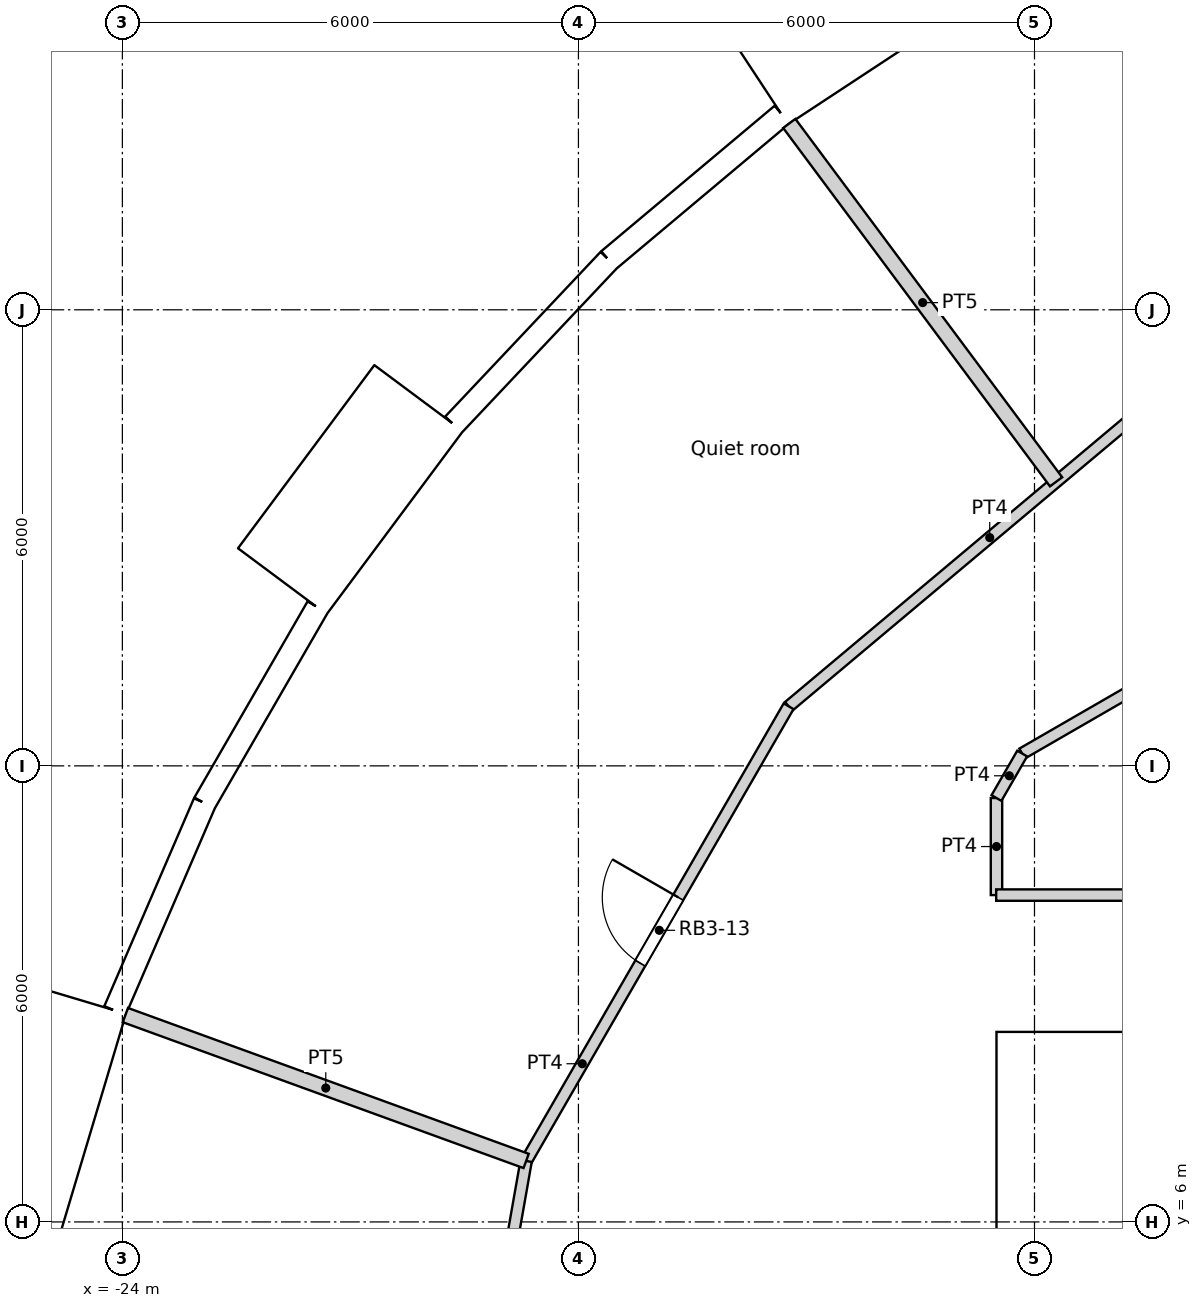
"""IFC4 building model, lengths in metres.
Left out: names, types, materials, properties, quantities, classifications, styles, units other than length and angle.
Written with IfcOpenShell. Run it as: python <this file> out.ifc"""

import sys

from ifc_helpers import new_model, si_unit, direction, frame, frame_2d, origin, origin_2d, place, context, subcontext, project, spatial, rectangle, circle, extrude, element, fill, save


model = new_model("IFC4")
c1 = context("Model", 3, precision=1e-05, world=origin(), true_north=direction((0.0, 1.0)))
c2 = subcontext(c1, "Body", "Model", "MODEL_VIEW")
j1 = project(units=[si_unit("LENGTHUNIT", "METRE"), si_unit("PLANEANGLEUNIT", "RADIAN")], contexts=[c1])
p1 = place(None, origin())
s1 = spatial("IfcSite", under=j1, at=p1, CompositionType="ELEMENT")
p2 = place(p1, origin())
s2 = spatial("IfcBuilding", under=s1, at=p2, CompositionType="ELEMENT")
p3 = place(p2, frame((0.0, 0.0, 147.6)))
s3 = spatial("IfcBuildingStorey", under=s2, at=p3, CompositionType="ELEMENT", Elevation=147.6)
for number, where, z_axis, x_axis in (
    (1, (-12.274, 21.259, 0.0), (0.0, 0.0, 1.0), (1.0, 0.0, 0.0)),
    (2, (-16.846, 17.855, 0.0), (0.0, 0.0, 1.0), (1.0, 0.0, 0.0)),
    (3, (-20.509, 13.489, 0.0), (0.0, 0.0, 1.0), (1.0, 0.0, 0.0)),
    (4, (-23.067, 8.396, 0.0), (0.0, 0.0, 1.0), (1.0, 0.0, 0.0)),
):
    element("IfcColumn", number, at=place(p3, frame(where, z_axis=z_axis, x_axis=x_axis)), inside=s3, PredefinedType="COLUMN", context=c2, shape_type="SweptSolid", body=[
        extrude(circle(Radius=0.6, at=origin_2d()), origin(), (0.0, 0.0, 1.0), 3.6),
    ])
for number, where, z_axis, x_axis in (
    (5, (-13.798, 12.802, 0.0), (0.0, 0.0, 1.0), (1.0, 0.0, 0.0)),
    (6, (-16.958, 8.167, 0.0), (0.0, 0.0, 1.0), (1.0, 0.0, 0.0)),
):
    element("IfcColumn", number, at=place(p3, frame(where, z_axis=z_axis, x_axis=x_axis)), inside=s3, PredefinedType="COLUMN", context=c2, shape_type="SweptSolid", body=[
        extrude(circle(Radius=0.65, at=origin_2d()), origin(), (0.0, 0.0, 1.0), 3.6),
    ])
p4 = place(p3, frame((-13.132, 22.697, -0.3), z_axis=(0.0, 0.0, 1.0), x_axis=(-0.835514416706, -0.549468524554, 0.0)))
e7 = element("IfcWall", 7, at=p4, inside=s3, PredefinedType="ELEMENTEDWALL", context=c2, shape_type="SweptSolid", body=[
    extrude(rectangle(XDim=3.0, YDim=1.45, at=frame_2d((1.5, 0.0))), origin(), (0.0, 0.0, 1.0), 3.6),
])
p5 = place(p4, frame((1.5, 0.0, 1.85)))
e8 = element("IfcOpeningElement", 8, at=p5, cuts=e7, PredefinedType="OPENING", context=c2, shape_type="SweptSolid", body=[
    extrude(circle(Radius=0.9, at=origin_2d()), frame((0.0, 0.735, 0.0), z_axis=(0.0, -1.0, 0.0), x_axis=(1.0, 0.0, 0.0)), (0.0, 0.0, 1.0), 1.47),
])
p6 = place(p3, frame((-15.323, 20.566, 0.0), z_axis=(0.0, 0.0, 1.0), x_axis=(-0.766049350637, -0.642781761089, 0.0)))
e9 = element("IfcWall", 9, at=p6, inside=s3, PredefinedType="SOLIDWALL", context=c2, shape_type="SweptSolid", body=[
    extrude(rectangle(XDim=2.973, YDim=0.3, at=frame_2d((1.486, 0.0))), origin(), (0.0, 0.0, 1.0), 3.3),
])
p7 = place(p6, frame((1.486, 0.0, 1.55)))
e10 = element("IfcOpeningElement", 10, at=p7, cuts=e9, PredefinedType="OPENING", context=c2, shape_type="SweptSolid", body=[
    extrude(circle(Radius=0.9, at=origin_2d()), frame((0.0, 0.16, 0.0), z_axis=(0.0, -1.0, 0.0), x_axis=(1.0, 0.0, 0.0)), (0.0, 0.0, 1.0), 0.32),
])
p8 = place(p3, frame((-17.6, 18.655, 0.0), z_axis=(0.0, 0.0, 1.0), x_axis=(-0.686235184166, -0.727379730273, 0.0)))
e11 = element("IfcWall", 11, at=p8, inside=s3, PredefinedType="SOLIDWALL", context=c2, shape_type="SweptSolid", body=[
    extrude(rectangle(XDim=2.973, YDim=0.3, at=frame_2d((1.486, 0.0))), origin(), (0.0, 0.0, 1.0), 3.3),
])
p9 = place(p8, frame((1.486, 0.0, 1.55)))
e12 = element("IfcOpeningElement", 12, at=p9, cuts=e11, PredefinedType="OPENING", context=c2, shape_type="SweptSolid", body=[
    extrude(circle(Radius=0.9, at=origin_2d()), frame((0.0, 0.16, 0.0), z_axis=(0.0, -1.0, 0.0), x_axis=(1.0, 0.0, 0.0)), (0.0, 0.0, 1.0), 0.32),
])
p10 = place(p3, frame((-20.103, 16.836, -0.3), z_axis=(0.0, 0.0, 1.0), x_axis=(-0.597183717734, -0.802104486506, 0.0)))
e13 = element("IfcWall", 13, at=p10, inside=s3, PredefinedType="ELEMENTEDWALL", context=c2, shape_type="SweptSolid", body=[
    extrude(rectangle(XDim=3.0, YDim=1.45, at=frame_2d((1.5, 0.0))), origin(), (0.0, 0.0, 1.0), 3.6),
])
p11 = place(p10, frame((1.5, 0.0, 1.85)))
e14 = element("IfcOpeningElement", 14, at=p11, cuts=e13, PredefinedType="OPENING", context=c2, shape_type="SweptSolid", body=[
    extrude(circle(Radius=0.9, at=origin_2d()), frame((0.0, 0.735, 0.0), z_axis=(0.0, -1.0, 0.0), x_axis=(1.0, 0.0, 0.0)), (0.0, 0.0, 1.0), 1.47),
])
p12 = place(p3, frame((-21.433, 14.085, 0.0), z_axis=(0.0, 0.0, 1.0), x_axis=(-0.500016263033, -0.866016014115, 0.0)))
e15 = element("IfcWall", 15, at=p12, inside=s3, PredefinedType="SOLIDWALL", context=c2, shape_type="SweptSolid", body=[
    extrude(rectangle(XDim=2.973, YDim=0.3, at=frame_2d((1.487, 0.0))), origin(), (0.0, 0.0, 1.0), 3.3),
])
p13 = place(p12, frame((1.486, 0.0, 1.55)))
e16 = element("IfcOpeningElement", 16, at=p13, cuts=e15, PredefinedType="OPENING", context=c2, shape_type="SweptSolid", body=[
    extrude(circle(Radius=0.9, at=origin_2d()), frame((0.0, 0.16, 0.0), z_axis=(0.0, -1.0, 0.0), x_axis=(1.0, 0.0, 0.0)), (0.0, 0.0, 1.0), 0.32),
])
p14 = place(p3, frame((-22.919, 11.51, 0.0), z_axis=(0.0, 0.0, 1.0), x_axis=(-0.396078892785, -0.918216483565, 0.0)))
e17 = element("IfcWall", 17, at=p14, inside=s3, PredefinedType="SOLIDWALL", context=c2, shape_type="SweptSolid", body=[
    extrude(rectangle(XDim=2.973, YDim=0.3, at=frame_2d((1.486, 0.0))), origin(), (0.0, 0.0, 1.0), 3.3),
])
p15 = place(p14, frame((1.486, 0.0, 1.55)))
e18 = element("IfcOpeningElement", 18, at=p15, cuts=e17, PredefinedType="OPENING", context=c2, shape_type="SweptSolid", body=[
    extrude(circle(Radius=0.9, at=origin_2d()), frame((0.0, 0.16, 0.0), z_axis=(0.0, -1.0, 0.0), x_axis=(1.0, 0.0, 0.0)), (0.0, 0.0, 1.0), 0.32),
])
p16 = place(p3, frame((-24.649, 8.945, -0.3), z_axis=(0.0, 0.0, 1.0), x_axis=(-0.286780420304, -0.957996341606, 0.0)))
e19 = element("IfcWall", 19, at=p16, inside=s3, PredefinedType="ELEMENTEDWALL", context=c2, shape_type="SweptSolid", body=[
    extrude(rectangle(XDim=3.0, YDim=1.45, at=frame_2d((1.5, 0.0))), origin(), (0.0, 0.0, 1.0), 3.6),
])
p17 = place(p16, frame((1.5, 0.0, 1.85)))
e20 = element("IfcOpeningElement", 20, at=p17, cuts=e19, PredefinedType="OPENING", context=c2, shape_type="SweptSolid", body=[
    extrude(circle(Radius=0.9, at=origin_2d()), frame((0.0, 0.735, 0.0), z_axis=(0.0, -1.0, 0.0), x_axis=(1.0, 0.0, 0.0)), (0.0, 0.0, 1.0), 1.47),
])
p18 = place(p3, frame((-24.958, 5.905, 0.0), z_axis=(0.0, 0.0, 1.0), x_axis=(-0.173686952598, -0.984800915159, 0.0)))
e21 = element("IfcWall", 21, at=p18, inside=s3, PredefinedType="SOLIDWALL", context=c2, shape_type="SweptSolid", body=[
    extrude(rectangle(XDim=2.973, YDim=0.3, at=frame_2d((1.486, 0.0))), origin(), (0.0, 0.0, 1.0), 3.3),
])
p19 = place(p18, frame((1.486, 0.0, 1.55)))
e22 = element("IfcOpeningElement", 22, at=p19, cuts=e21, PredefinedType="OPENING", context=c2, shape_type="SweptSolid", body=[
    extrude(circle(Radius=0.9, at=origin_2d()), frame((0.0, 0.16, 0.0), z_axis=(0.0, -1.0, 0.0), x_axis=(1.0, 0.0, 0.0)), (0.0, 0.0, 1.0), 0.32),
])
p20 = place(p3, frame((-12.5, 8.05, 0.0), z_axis=(0.0, 0.0, 1.0), x_axis=(1.0, 0.0, 0.0)))
e23 = element("IfcWall", 23, at=p20, inside=s3, PredefinedType="SOLIDWALL", context=c2, shape_type="SweptSolid", body=[
    extrude(rectangle(XDim=25.0, YDim=0.9, at=frame_2d((12.5, 0.0))), origin(), (0.0, 0.0, 1.0), 3.6),
])
p21 = place(p20, frame((8.3, 0.0, 0.0)))
e24 = element("IfcOpeningElement", 24, at=p21, cuts=e23, PredefinedType="OPENING", context=c2, shape_type="SweptSolid", body=[
    extrude(rectangle(XDim=1.8, YDim=2.1, at=frame_2d((0.9, 1.05))), frame((0.0, 0.45, 0.0), z_axis=(0.0, -1.0, 0.0), x_axis=(1.0, 0.0, 0.0)), (0.0, 0.0, 1.0), 0.9),
])
p22 = place(p3, frame((-12.05, -7.6, 0.0), z_axis=(0.0, 0.0, 1.0), x_axis=(0.0, 1.0, 0.0)))
e25 = element("IfcWall", 25, at=p22, inside=s3, PredefinedType="SOLIDWALL", context=c2, shape_type="SweptSolid", body=[
    extrude(rectangle(XDim=15.2, YDim=0.9, at=frame_2d((7.6, 0.0))), origin(), (0.0, 0.0, 1.0), 3.6),
])
p23 = place(p22, frame((7.1, 0.0, 0.0)))
e26 = element("IfcOpeningElement", 26, at=p23, cuts=e25, PredefinedType="OPENING", context=c2, shape_type="SweptSolid", body=[
    extrude(rectangle(XDim=1.0, YDim=2.1, at=frame_2d((0.5, 1.05))), frame((0.0, 0.45, 0.0), z_axis=(0.0, -1.0, 0.0), x_axis=(1.0, 0.0, 0.0)), (0.0, 0.0, 1.0), 0.9),
])
p24 = place(p3, frame((-12.504, 10.3, 0.0), z_axis=(0.0, 0.0, 1.0), x_axis=(1.0, 0.0, 0.0)))
e27 = element("IfcWall", 27, at=p24, inside=s3, PredefinedType="PARTITIONING", context=c2, shape_type="SweptSolid", body=[
    extrude(rectangle(XDim=7.687, YDim=0.15, at=frame_2d((3.844, 0.0))), origin(), (0.0, 0.0, 1.0), 3.3),
])
p25 = place(p3, frame((-12.162, 12.162, 0.0), z_axis=(0.0, 0.0, 1.0), x_axis=(0.866004766557, 0.500035743023, 0.0)))
e28 = element("IfcWall", 28, at=p25, inside=s3, PredefinedType="PARTITIONING", context=c2, shape_type="SweptSolid", body=[
    extrude(rectangle(XDim=8.477, YDim=0.15, at=frame_2d((4.239, 0.0))), origin(), (0.0, 0.0, 1.0), 3.3),
])
p26 = place(p25, frame((3.739, 0.0, 0.0)))
e29 = element("IfcOpeningElement", 29, at=p26, cuts=e28, PredefinedType="OPENING", context=c2, shape_type="SweptSolid", body=[
    extrude(rectangle(XDim=1.0, YDim=2.04, at=frame_2d((0.5, 1.02))), frame((0.0, 0.075, 0.0), z_axis=(0.0, -1.0, 0.0), x_axis=(1.0, 0.0, 0.0)), (0.0, 0.0, 1.0), 0.15),
])
p27 = place(p3, frame((-15.234, 12.783, 0.0), z_axis=(0.0, 0.0, 1.0), x_axis=(0.765936018543, 0.642916802937, 0.0)))
e30 = element("IfcWall", 30, at=p27, inside=s3, PredefinedType="PARTITIONING", context=c2, shape_type="SweptSolid", body=[
    extrude(rectangle(XDim=6.906, YDim=0.15, at=frame_2d((3.453, 0.0))), origin(), (0.0, 0.0, 1.0), 3.3),
])
p28 = place(p3, frame((-12.5, 11.577, 0.0), z_axis=(0.0, 0.0, 1.0), x_axis=(0.500024767483, 0.866011103799, 0.0)))
e31 = element("IfcWall", 31, at=p28, inside=s3, PredefinedType="PARTITIONING", context=c2, shape_type="SweptSolid", body=[
    extrude(rectangle(XDim=0.676, YDim=0.15, at=frame_2d((0.338, 0.0))), origin(), (0.0, 0.0, 1.0), 3.3),
])
p29 = place(p3, frame((-12.5, 10.3, 0.0), z_axis=(0.0, 0.0, 1.0), x_axis=(0.0, 1.0, 0.0)))
e32 = element("IfcWall", 32, at=p29, inside=s3, PredefinedType="PARTITIONING", context=c2, shape_type="SweptSolid", body=[
    extrude(rectangle(XDim=1.277, YDim=0.15, at=frame_2d((0.638, 0.0))), origin(), (0.0, 0.0, 1.0), 3.3),
])
p30 = place(p3, frame((-18.688, 6.802, 0.0), z_axis=(0.0, 0.0, 1.0), x_axis=(0.499914202267, 0.866074933462, 0.0)))
e33 = element("IfcWall", 33, at=p30, inside=s3, PredefinedType="PARTITIONING", context=c2, shape_type="SweptSolid", body=[
    extrude(rectangle(XDim=6.907, YDim=0.15, at=frame_2d((3.454, 0.0))), origin(), (0.0, 0.0, 1.0), 3.3),
])
p31 = place(p30, frame((3.004, 0.0, 0.0)))
e34 = element("IfcOpeningElement", 34, at=p31, cuts=e33, PredefinedType="OPENING", context=c2, shape_type="SweptSolid", body=[
    extrude(rectangle(XDim=1.0, YDim=2.04, at=frame_2d((0.5, 1.02))), frame((0.0, 0.075, 0.0), z_axis=(0.0, -1.0, 0.0), x_axis=(1.0, 0.0, 0.0)), (0.0, 0.0, 1.0), 0.15),
])
p32 = place(p3, frame((-19.888, 0.0, 0.0), z_axis=(0.0, 0.0, 1.0), x_axis=(0.173728873845, 0.98479352069, 0.0)))
e35 = element("IfcWall", 35, at=p32, inside=s3, PredefinedType="PARTITIONING", context=c2, shape_type="SweptSolid", body=[
    extrude(rectangle(XDim=6.907, YDim=0.15, at=frame_2d((3.454, 0.0))), origin(), (0.0, 0.0, 1.0), 3.3),
])
p33 = place(p32, frame((4.004, 0.0, 0.0)))
e36 = element("IfcOpeningElement", 36, at=p33, cuts=e35, PredefinedType="OPENING", context=c2, shape_type="SweptSolid", body=[
    extrude(rectangle(XDim=1.5, YDim=2.1, at=frame_2d((0.75, 1.05))), frame((0.0, 0.075, 0.0), z_axis=(0.0, -1.0, 0.0), x_axis=(1.0, 0.0, 0.0)), (0.0, 0.0, 1.0), 0.15),
])
p34 = place(p3, frame((-15.226, 20.452, 0.0), z_axis=(0.0, 0.0, 1.0), x_axis=(0.597151875745, -0.802128192557, 0.0)))
e37 = element("IfcWall", 37, at=p34, inside=s3, PredefinedType="PARTITIONING", context=c2, shape_type="SweptSolid", body=[
    extrude(rectangle(XDim=5.878, YDim=0.2, at=frame_2d((2.939, 0.0))), origin(), (0.0, 0.0, 1.0), 3.3),
])
p35 = place(p3, frame((-23.96, 8.721, 0.0), z_axis=(0.0, 0.0, 1.0), x_axis=(0.939686652043, -0.342036541866, 0.0)))
e38 = element("IfcWall", 38, at=p35, inside=s3, PredefinedType="PARTITIONING", context=c2, shape_type="SweptSolid", body=[
    extrude(rectangle(XDim=5.61, YDim=0.2, at=frame_2d((2.805, 0.0))), origin(), (0.0, 0.0, 1.0), 3.3),
])
p36 = place(p5, origin())
e39 = element("IfcWindow", 39, at=p36, inside=s3, PartitioningType="SINGLE_PANEL", PredefinedType="WINDOW", context=c2, shape_type="SweptSolid", body=[
    extrude(circle(Radius=0.9, at=origin_2d()), frame((0.0, 0.695, 0.0), z_axis=(0.0, -1.0, 0.0), x_axis=(1.0, 0.0, 0.0)), (0.0, 0.0, 1.0), 0.1),
])
fill(e8, e39)
p37 = place(p7, origin())
e40 = element("IfcWindow", 40, at=p37, inside=s3, PartitioningType="SINGLE_PANEL", PredefinedType="WINDOW", context=c2, shape_type="SweptSolid", body=[
    extrude(circle(Radius=0.9, at=origin_2d()), frame((0.0, 0.12, 0.0), z_axis=(0.0, -1.0, 0.0), x_axis=(1.0, 0.0, 0.0)), (0.0, 0.0, 1.0), 0.1),
])
fill(e10, e40)
p38 = place(p9, origin())
e41 = element("IfcWindow", 41, at=p38, inside=s3, PartitioningType="SINGLE_PANEL", PredefinedType="WINDOW", context=c2, shape_type="SweptSolid", body=[
    extrude(circle(Radius=0.9, at=origin_2d()), frame((0.0, 0.12, 0.0), z_axis=(0.0, -1.0, 0.0), x_axis=(1.0, 0.0, 0.0)), (0.0, 0.0, 1.0), 0.1),
])
fill(e12, e41)
p39 = place(p11, origin())
e42 = element("IfcWindow", 42, at=p39, inside=s3, PartitioningType="SINGLE_PANEL", PredefinedType="WINDOW", context=c2, shape_type="SweptSolid", body=[
    extrude(circle(Radius=0.9, at=origin_2d()), frame((0.0, 0.695, 0.0), z_axis=(0.0, -1.0, 0.0), x_axis=(1.0, 0.0, 0.0)), (0.0, 0.0, 1.0), 0.1),
])
fill(e14, e42)
p40 = place(p13, origin())
e43 = element("IfcWindow", 43, at=p40, inside=s3, PartitioningType="SINGLE_PANEL", PredefinedType="WINDOW", context=c2, shape_type="SweptSolid", body=[
    extrude(circle(Radius=0.9, at=origin_2d()), frame((0.0, 0.12, 0.0), z_axis=(0.0, -1.0, 0.0), x_axis=(1.0, 0.0, 0.0)), (0.0, 0.0, 1.0), 0.1),
])
fill(e16, e43)
p41 = place(p15, origin())
e44 = element("IfcWindow", 44, at=p41, inside=s3, PartitioningType="SINGLE_PANEL", PredefinedType="WINDOW", context=c2, shape_type="SweptSolid", body=[
    extrude(circle(Radius=0.9, at=origin_2d()), frame((0.0, 0.12, 0.0), z_axis=(0.0, -1.0, 0.0), x_axis=(1.0, 0.0, 0.0)), (0.0, 0.0, 1.0), 0.1),
])
fill(e18, e44)
p42 = place(p17, origin())
e45 = element("IfcWindow", 45, at=p42, inside=s3, PartitioningType="SINGLE_PANEL", PredefinedType="WINDOW", context=c2, shape_type="SweptSolid", body=[
    extrude(circle(Radius=0.9, at=origin_2d()), frame((0.0, 0.695, 0.0), z_axis=(0.0, -1.0, 0.0), x_axis=(1.0, 0.0, 0.0)), (0.0, 0.0, 1.0), 0.1),
])
fill(e20, e45)
p43 = place(p31, origin())
e46 = element("IfcDoor", 46, at=p43, inside=s3, OperationType="SINGLE_SWING_RIGHT", PredefinedType="DOOR", context=c2, shape_type="SweptSolid", body=[
    extrude(rectangle(XDim=1.0, YDim=2.04, at=frame_2d((0.5, 1.02))), frame((0.0, 0.025, 0.0), z_axis=(0.0, -1.0, 0.0), x_axis=(1.0, 0.0, 0.0)), (0.0, 0.0, 1.0), 0.05),
])
fill(e34, e46)
save(model, sys.argv[1])
